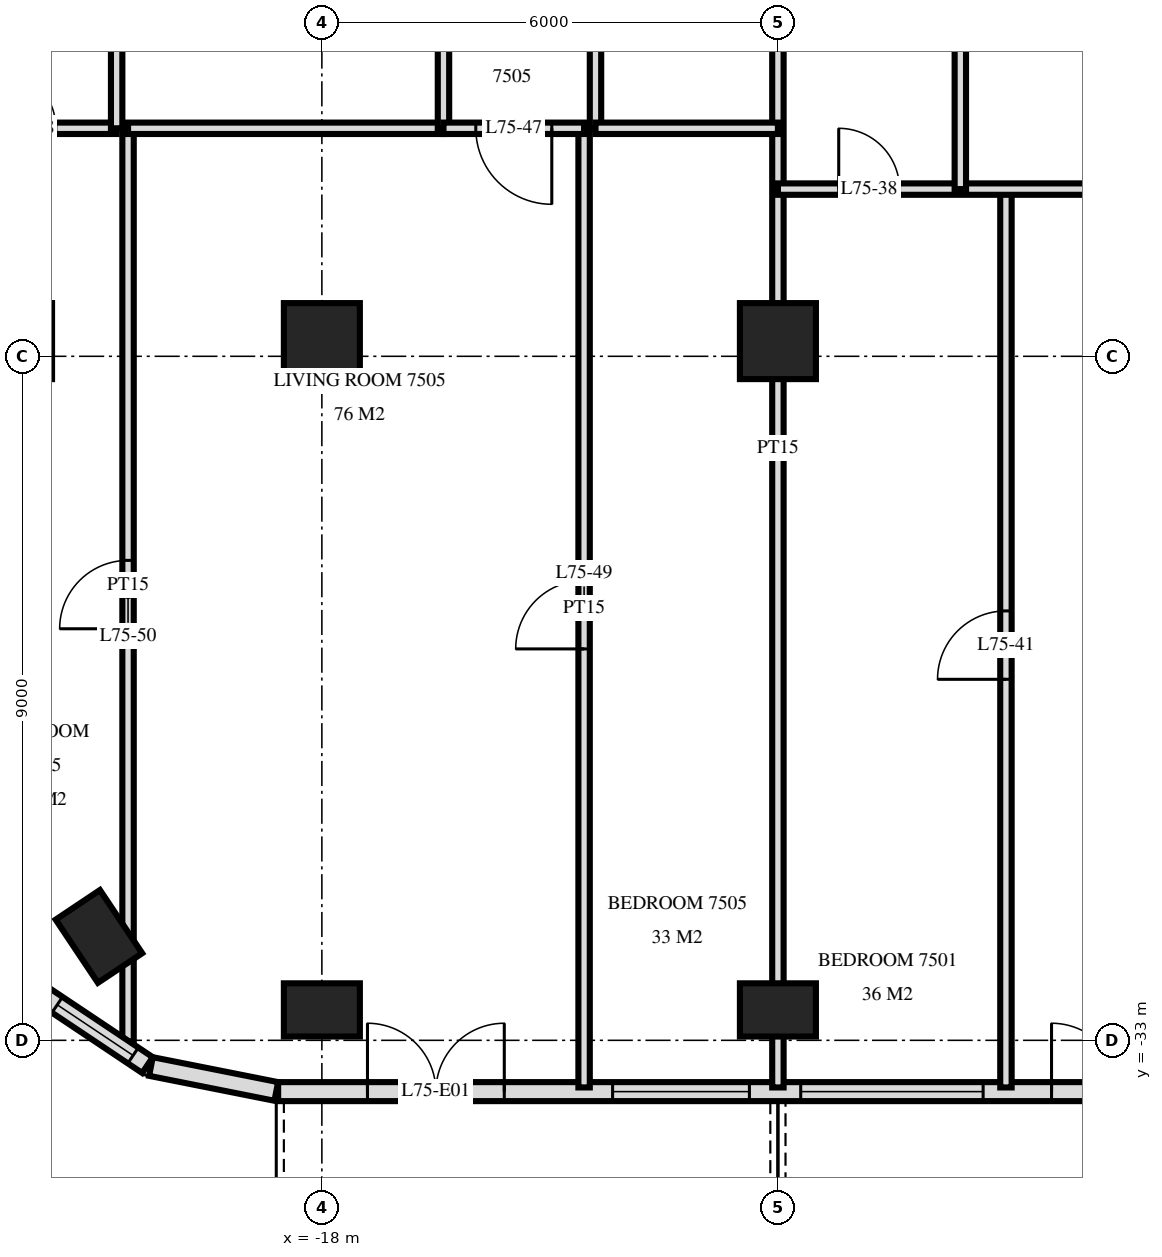
"""IFC4 building model, lengths in metres.
Left out: names, types, materials, properties, quantities, classifications, styles, units other than length and angle.
Written with IfcOpenShell. Run it as: python <this file> out.ifc"""

import sys

from ifc_helpers import new_model, si_unit, direction, frame, frame_2d, origin, origin_2d, place, context, subcontext, project, spatial, rectangle, extrude, element, fill, save


model = new_model("IFC4")
c1 = context("Model", 3, precision=1e-05, world=origin(), true_north=direction((0.0, 1.0)))
c2 = subcontext(c1, "Body", "Model", "MODEL_VIEW")
j1 = project(units=[si_unit("LENGTHUNIT", "METRE"), si_unit("PLANEANGLEUNIT", "RADIAN")], contexts=[c1])
p1 = place(None, origin())
s1 = spatial("IfcSite", under=j1, at=p1, CompositionType="ELEMENT")
p2 = place(p1, origin())
s2 = spatial("IfcBuilding", under=s1, at=p2, CompositionType="ELEMENT")
p3 = place(p2, frame((0.0, 0.0, 284.1)))
s3 = spatial("IfcBuildingStorey", under=s2, at=p3, CompositionType="ELEMENT", Elevation=284.1)
for number, where, z_axis, x_axis in (
    (1, (-21.9, -23.8, 0.0), (0.0, 0.0, 1.0), (0.0, 1.0, 0.0)),
    (2, (-20.933, -31.633, 0.0), (0.0, 0.0, 1.0), (-0.556, 0.831, 0.0)),
    (3, (-18.0, -32.6, 0.0), (0.0, 0.0, 1.0), (1.0, 0.0, 0.0)),
):
    element("IfcColumn", number, at=place(p3, frame(where, z_axis=z_axis, x_axis=x_axis)), inside=s3, PredefinedType="COLUMN", context=c2, shape_type="SweptSolid", body=[
        extrude(rectangle(XDim=1.0, YDim=0.7, at=origin_2d()), origin(), (0.0, 0.0, 1.0), 3.5),
    ])
p4 = place(p3, frame((-18.0, -23.8, 0.0), z_axis=(0.0, 0.0, 1.0), x_axis=(1.0, 0.0, 0.0)))
e4 = element("IfcColumn", 4, at=p4, inside=s3, PredefinedType="COLUMN", context=c2, shape_type="SweptSolid", body=[
    extrude(rectangle(XDim=1.0, YDim=1.0, at=origin_2d()), origin(), (0.0, 0.0, 1.0), 3.5),
])
p5 = place(p3, frame((-12.0, -32.6, 0.0), z_axis=(0.0, 0.0, 1.0), x_axis=(1.0, 0.0, 0.0)))
e5 = element("IfcColumn", 5, at=p5, inside=s3, PredefinedType="COLUMN", context=c2, shape_type="SweptSolid", body=[
    extrude(rectangle(XDim=1.0, YDim=0.7, at=origin_2d()), origin(), (0.0, 0.0, 1.0), 3.5),
])
p6 = place(p3, frame((-12.0, -23.8, 0.0), z_axis=(0.0, 0.0, 1.0), x_axis=(1.0, 0.0, 0.0)))
e6 = element("IfcColumn", 6, at=p6, inside=s3, PredefinedType="COLUMN", context=c2, shape_type="SweptSolid", body=[
    extrude(rectangle(XDim=1.0, YDim=1.0, at=origin_2d()), origin(), (0.0, 0.0, 1.0), 3.5),
])
p7 = place(p3, frame((-21.671, -32.406, 0.0), z_axis=(0.0, 0.0, 1.0), x_axis=(0.831482937015, -0.55555029066, 0.0)))
e7 = element("IfcWall", 7, at=p7, inside=s3, PredefinedType="SOLIDWALL", context=c2, shape_type="SweptSolid", body=[
    extrude(rectangle(XDim=1.656, YDim=0.25, at=frame_2d((0.828, 0.0))), origin(), (0.0, 0.0, 1.0), 3.22),
])
p8 = place(p7, frame((0.228, 0.0, 0.9)))
e8 = element("IfcOpeningElement", 8, at=p8, cuts=e7, PredefinedType="OPENING", context=c2, shape_type="SweptSolid", body=[
    extrude(rectangle(XDim=1.2, YDim=1.5, at=frame_2d((0.6, 0.75))), frame((0.0, 0.135, 0.0), z_axis=(0.0, -1.0, 0.0), x_axis=(1.0, 0.0, 0.0)), (0.0, 0.0, 1.0), 0.27),
])
p9 = place(p3, frame((-20.249, -33.344, 0.0), z_axis=(0.0, 0.0, 1.0), x_axis=(0.980770110232, -0.195166572128, 0.0)))
e9 = element("IfcWall", 9, at=p9, inside=s3, PredefinedType="SOLIDWALL", context=c2, shape_type="SweptSolid", body=[
    extrude(rectangle(XDim=1.681, YDim=0.25, at=frame_2d((0.841, 0.0))), origin(), (0.0, 0.0, 1.0), 3.22),
])
p10 = place(p3, frame((-18.575, -33.675, 0.0), z_axis=(0.0, 0.0, 1.0), x_axis=(1.0, 0.0, 0.0)))
e10 = element("IfcWall", 10, at=p10, inside=s3, PredefinedType="SOLIDWALL", context=c2, shape_type="SweptSolid", body=[
    extrude(rectangle(XDim=37.151, YDim=0.25, at=frame_2d((18.575, 0.0))), origin(), (0.0, 0.0, 1.0), 3.22),
])
p11 = place(p10, frame((1.175, 0.0, 0.0)))
e11 = element("IfcOpeningElement", 11, at=p11, cuts=e10, PredefinedType="OPENING", context=c2, shape_type="SweptSolid", body=[
    extrude(rectangle(XDim=1.8, YDim=2.4, at=frame_2d((0.9, 1.2))), frame((0.0, 0.135, 0.0), z_axis=(0.0, -1.0, 0.0), x_axis=(1.0, 0.0, 0.0)), (0.0, 0.0, 1.0), 0.27),
])
p12 = place(p10, frame((4.4, 0.0, 0.9)))
e12 = element("IfcOpeningElement", 12, at=p12, cuts=e10, PredefinedType="OPENING", context=c2, shape_type="SweptSolid", body=[
    extrude(rectangle(XDim=1.8, YDim=1.5, at=frame_2d((0.9, 0.75))), frame((0.0, 0.135, 0.0), z_axis=(0.0, -1.0, 0.0), x_axis=(1.0, 0.0, 0.0)), (0.0, 0.0, 1.0), 0.27),
])
p13 = place(p10, frame((6.875, 0.0, 0.9)))
e13 = element("IfcOpeningElement", 13, at=p13, cuts=e10, PredefinedType="OPENING", context=c2, shape_type="SweptSolid", body=[
    extrude(rectangle(XDim=2.4, YDim=1.5, at=frame_2d((1.2, 0.75))), frame((0.0, 0.135, 0.0), z_axis=(0.0, -1.0, 0.0), x_axis=(1.0, 0.0, 0.0)), (0.0, 0.0, 1.0), 0.27),
])
p14 = place(p10, frame((10.175, 0.0, 0.0)))
e14 = element("IfcOpeningElement", 14, at=p14, cuts=e10, PredefinedType="OPENING", context=c2, shape_type="SweptSolid", body=[
    extrude(rectangle(XDim=1.8, YDim=2.4, at=frame_2d((0.9, 1.2))), frame((0.0, 0.135, 0.0), z_axis=(0.0, -1.0, 0.0), x_axis=(1.0, 0.0, 0.0)), (0.0, 0.0, 1.0), 0.27),
])
p15 = place(p10, frame((13.175, 0.0, 0.0)))
e15 = element("IfcOpeningElement", 15, at=p15, cuts=e10, PredefinedType="OPENING", context=c2, shape_type="SweptSolid", body=[
    extrude(rectangle(XDim=1.8, YDim=2.4, at=frame_2d((0.9, 1.2))), frame((0.0, 0.135, 0.0), z_axis=(0.0, -1.0, 0.0), x_axis=(1.0, 0.0, 0.0)), (0.0, 0.0, 1.0), 0.27),
])
p16 = place(p10, frame((15.875, 0.0, 0.9)))
e16 = element("IfcOpeningElement", 16, at=p16, cuts=e10, PredefinedType="OPENING", context=c2, shape_type="SweptSolid", body=[
    extrude(rectangle(XDim=2.4, YDim=1.5, at=frame_2d((1.2, 0.75))), frame((0.0, 0.135, 0.0), z_axis=(0.0, -1.0, 0.0), x_axis=(1.0, 0.0, 0.0)), (0.0, 0.0, 1.0), 0.27),
])
p17 = place(p10, frame((19.175, 0.0, 0.0)))
e17 = element("IfcOpeningElement", 17, at=p17, cuts=e10, PredefinedType="OPENING", context=c2, shape_type="SweptSolid", body=[
    extrude(rectangle(XDim=1.8, YDim=2.4, at=frame_2d((0.9, 1.2))), frame((0.0, 0.135, 0.0), z_axis=(0.0, -1.0, 0.0), x_axis=(1.0, 0.0, 0.0)), (0.0, 0.0, 1.0), 0.27),
])
p18 = place(p10, frame((21.875, 0.0, 0.9)))
e18 = element("IfcOpeningElement", 18, at=p18, cuts=e10, PredefinedType="OPENING", context=c2, shape_type="SweptSolid", body=[
    extrude(rectangle(XDim=2.4, YDim=1.5, at=frame_2d((1.2, 0.75))), frame((0.0, 0.135, 0.0), z_axis=(0.0, -1.0, 0.0), x_axis=(1.0, 0.0, 0.0)), (0.0, 0.0, 1.0), 0.27),
])
p19 = place(p10, frame((25.063, 0.0, 0.9)))
e19 = element("IfcOpeningElement", 19, at=p19, cuts=e10, PredefinedType="OPENING", context=c2, shape_type="SweptSolid", body=[
    extrude(rectangle(XDim=1.8, YDim=1.5, at=frame_2d((0.9, 0.75))), frame((0.0, 0.135, 0.0), z_axis=(0.0, -1.0, 0.0), x_axis=(1.0, 0.0, 0.0)), (0.0, 0.0, 1.0), 0.27),
])
p20 = place(p10, frame((27.838, 0.0, 0.0)))
e20 = element("IfcOpeningElement", 20, at=p20, cuts=e10, PredefinedType="OPENING", context=c2, shape_type="SweptSolid", body=[
    extrude(rectangle(XDim=1.8, YDim=2.4, at=frame_2d((0.9, 1.2))), frame((0.0, 0.135, 0.0), z_axis=(0.0, -1.0, 0.0), x_axis=(1.0, 0.0, 0.0)), (0.0, 0.0, 1.0), 0.27),
])
p21 = place(p10, frame((31.175, 0.0, 0.0)))
e21 = element("IfcOpeningElement", 21, at=p21, cuts=e10, PredefinedType="OPENING", context=c2, shape_type="SweptSolid", body=[
    extrude(rectangle(XDim=1.8, YDim=2.4, at=frame_2d((0.9, 1.2))), frame((0.0, 0.135, 0.0), z_axis=(0.0, -1.0, 0.0), x_axis=(1.0, 0.0, 0.0)), (0.0, 0.0, 1.0), 0.27),
])
p22 = place(p3, frame((-9.0, -33.62, 0.0), z_axis=(0.0, 0.0, 1.0), x_axis=(0.0, 1.0, 0.0)))
e22 = element("IfcWall", 22, at=p22, inside=s3, PredefinedType="PARTITIONING", context=c2, shape_type="SweptSolid", body=[
    extrude(rectangle(XDim=11.82, YDim=0.15, at=frame_2d((5.91, 0.0))), origin(), (0.0, 0.0, 1.0), 3.22),
])
p23 = place(p22, frame((5.37, 0.0, 0.0)))
e23 = element("IfcOpeningElement", 23, at=p23, cuts=e22, PredefinedType="OPENING", context=c2, shape_type="SweptSolid", body=[
    extrude(rectangle(XDim=0.9, YDim=2.1, at=frame_2d((0.45, 1.05))), frame((0.0, 0.085, 0.0), z_axis=(0.0, -1.0, 0.0), x_axis=(1.0, 0.0, 0.0)), (0.0, 0.0, 1.0), 0.17),
])
p24 = place(p3, frame((-9.6, -21.8, 0.0), z_axis=(0.0, 0.0, 1.0), x_axis=(0.0, 1.0, 0.0)))
e24 = element("IfcWall", 24, at=p24, inside=s3, PredefinedType="PARTITIONING", context=c2, shape_type="SweptSolid", body=[
    extrude(rectangle(XDim=5.0, YDim=0.15, at=frame_2d((2.5, 0.0))), origin(), (0.0, 0.0, 1.0), 3.22),
])
p25 = place(p3, frame((-12.0, -33.62, 0.0), z_axis=(0.0, 0.0, 1.0), x_axis=(0.0, 1.0, 0.0)))
e25 = element("IfcWall", 25, at=p25, inside=s3, PredefinedType="PARTITIONING", context=c2, shape_type="SweptSolid", body=[
    extrude(rectangle(XDim=16.82, YDim=0.15, at=frame_2d((8.41, 0.0))), origin(), (0.0, 0.0, 1.0), 3.22),
])
p26 = place(p3, frame((-14.4, -21.0, 0.0), z_axis=(0.0, 0.0, 1.0), x_axis=(0.0, 1.0, 0.0)))
e26 = element("IfcWall", 26, at=p26, inside=s3, PredefinedType="PARTITIONING", context=c2, shape_type="SweptSolid", body=[
    extrude(rectangle(XDim=4.2, YDim=0.15, at=frame_2d((2.1, 0.0))), origin(), (0.0, 0.0, 1.0), 3.22),
])
p27 = place(p26, frame((1.6, 0.0, 0.0)))
e27 = element("IfcOpeningElement", 27, at=p27, cuts=e26, PredefinedType="OPENING", context=c2, shape_type="SweptSolid", body=[
    extrude(rectangle(XDim=1.0, YDim=2.1, at=frame_2d((0.5, 1.05))), frame((0.0, 0.085, 0.0), z_axis=(0.0, -1.0, 0.0), x_axis=(1.0, 0.0, 0.0)), (0.0, 0.0, 1.0), 0.17),
])
p28 = place(p3, frame((-14.55, -33.62, 0.0), z_axis=(0.0, 0.0, 1.0), x_axis=(0.0, 1.0, 0.0)))
e28 = element("IfcWall", 28, at=p28, inside=s3, PredefinedType="PARTITIONING", context=c2, shape_type="SweptSolid", body=[
    extrude(rectangle(XDim=12.62, YDim=0.15, at=frame_2d((6.31, 0.0))), origin(), (0.0, 0.0, 1.0), 3.22),
])
p29 = place(p28, frame((5.77, 0.0, 0.0)))
e29 = element("IfcOpeningElement", 29, at=p29, cuts=e28, PredefinedType="OPENING", context=c2, shape_type="SweptSolid", body=[
    extrude(rectangle(XDim=0.9, YDim=2.1, at=frame_2d((0.45, 1.05))), frame((0.0, 0.085, 0.0), z_axis=(0.0, -1.0, 0.0), x_axis=(1.0, 0.0, 0.0)), (0.0, 0.0, 1.0), 0.17),
])
p30 = place(p3, frame((-16.4, -21.0, 0.0), z_axis=(0.0, 0.0, 1.0), x_axis=(0.0, 1.0, 0.0)))
e30 = element("IfcWall", 30, at=p30, inside=s3, PredefinedType="PARTITIONING", context=c2, shape_type="SweptSolid", body=[
    extrude(rectangle(XDim=4.2, YDim=0.15, at=frame_2d((2.1, 0.0))), origin(), (0.0, 0.0, 1.0), 3.22),
])
p31 = place(p30, frame((1.6, 0.0, 0.0)))
e31 = element("IfcOpeningElement", 31, at=p31, cuts=e30, PredefinedType="OPENING", context=c2, shape_type="SweptSolid", body=[
    extrude(rectangle(XDim=1.0, YDim=2.1, at=frame_2d((0.5, 1.05))), frame((0.0, 0.085, 0.0), z_axis=(0.0, -1.0, 0.0), x_axis=(1.0, 0.0, 0.0)), (0.0, 0.0, 1.0), 0.17),
])
p32 = place(p3, frame((-20.55, -33.017, 0.0), z_axis=(0.0, 0.0, 1.0), x_axis=(0.0, 1.0, 0.0)))
e32 = element("IfcWall", 32, at=p32, inside=s3, PredefinedType="PARTITIONING", context=c2, shape_type="SweptSolid", body=[
    extrude(rectangle(XDim=12.017, YDim=0.15, at=frame_2d((6.008, 0.0))), origin(), (0.0, 0.0, 1.0), 3.22),
])
p33 = place(p32, frame((5.432, 0.0, 0.0)))
e33 = element("IfcOpeningElement", 33, at=p33, cuts=e32, PredefinedType="OPENING", context=c2, shape_type="SweptSolid", body=[
    extrude(rectangle(XDim=0.9, YDim=2.1, at=frame_2d((0.45, 1.05))), frame((0.0, 0.085, 0.0), z_axis=(0.0, -1.0, 0.0), x_axis=(1.0, 0.0, 0.0)), (0.0, 0.0, 1.0), 0.17),
])
p34 = place(p3, frame((-20.7, -21.0, 0.0), z_axis=(0.0, 0.0, 1.0), x_axis=(0.0, 1.0, 0.0)))
e34 = element("IfcWall", 34, at=p34, inside=s3, PredefinedType="PARTITIONING", context=c2, shape_type="SweptSolid", body=[
    extrude(rectangle(XDim=4.2, YDim=0.15, at=frame_2d((2.1, 0.0))), origin(), (0.0, 0.0, 1.0), 3.22),
])
p35 = place(p3, frame((-12.0, -21.8, 0.0), z_axis=(0.0, 0.0, 1.0), x_axis=(1.0, 0.0, 0.0)))
e35 = element("IfcWall", 35, at=p35, inside=s3, PredefinedType="PARTITIONING", context=c2, shape_type="SweptSolid", body=[
    extrude(rectangle(XDim=5.4, YDim=0.15, at=frame_2d((2.7, 0.0))), origin(), (0.0, 0.0, 1.0), 3.22),
])
p36 = place(p35, frame((0.8, 0.0, 0.0)))
e36 = element("IfcOpeningElement", 36, at=p36, cuts=e35, PredefinedType="OPENING", context=c2, shape_type="SweptSolid", body=[
    extrude(rectangle(XDim=0.8, YDim=2.1, at=frame_2d((0.4, 1.05))), frame((0.0, 0.085, 0.0), z_axis=(0.0, -1.0, 0.0), x_axis=(1.0, 0.0, 0.0)), (0.0, 0.0, 1.0), 0.17),
])
p37 = place(p3, frame((-16.4, -21.0, 0.0), z_axis=(0.0, 0.0, 1.0), x_axis=(1.0, 0.0, 0.0)))
e37 = element("IfcWall", 37, at=p37, inside=s3, PredefinedType="PARTITIONING", context=c2, shape_type="SweptSolid", body=[
    extrude(rectangle(XDim=1.85, YDim=0.15, at=frame_2d((0.925, 0.0))), origin(), (0.0, 0.0, 1.0), 3.22),
])
p38 = place(p37, frame((0.425, 0.0, 0.0)))
e38 = element("IfcOpeningElement", 38, at=p38, cuts=e37, PredefinedType="OPENING", context=c2, shape_type="SweptSolid", body=[
    extrude(rectangle(XDim=1.0, YDim=2.1, at=frame_2d((0.5, 1.05))), frame((0.0, 0.085, 0.0), z_axis=(0.0, -1.0, 0.0), x_axis=(1.0, 0.0, 0.0)), (0.0, 0.0, 1.0), 0.17),
])
p39 = place(p3, frame((-22.92, -21.0, 0.0), z_axis=(0.0, 0.0, 1.0), x_axis=(1.0, 0.0, 0.0)))
e39 = element("IfcWall", 39, at=p39, inside=s3, PredefinedType="PARTITIONING", context=c2, shape_type="SweptSolid", body=[
    extrude(rectangle(XDim=2.22, YDim=0.15, at=frame_2d((1.11, 0.0))), origin(), (0.0, 0.0, 1.0), 3.22),
])
p40 = place(p39, frame((0.62, 0.0, 0.0)))
e40 = element("IfcOpeningElement", 40, at=p40, cuts=e39, PredefinedType="OPENING", context=c2, shape_type="SweptSolid", body=[
    extrude(rectangle(XDim=0.8, YDim=2.1, at=frame_2d((0.4, 1.05))), frame((0.0, 0.085, 0.0), z_axis=(0.0, -1.0, 0.0), x_axis=(1.0, 0.0, 0.0)), (0.0, 0.0, 1.0), 0.17),
])
p41 = place(p3, frame((-20.55, -21.0, 0.0), z_axis=(0.0, 0.0, 1.0), x_axis=(1.0, 0.0, 0.0)))
e41 = element("IfcWall", 41, at=p41, inside=s3, PredefinedType="PARTITIONING", context=c2, shape_type="SweptSolid", body=[
    extrude(rectangle(XDim=4.15, YDim=0.15, at=frame_2d((2.075, 0.0))), origin(), (0.0, 0.0, 1.0), 3.22),
])
p42 = place(p3, frame((-14.4, -21.0, 0.0), z_axis=(0.0, 0.0, 1.0), x_axis=(1.0, 0.0, 0.0)))
e42 = element("IfcWall", 42, at=p42, inside=s3, PredefinedType="PARTITIONING", context=c2, shape_type="SweptSolid", body=[
    extrude(rectangle(XDim=2.4, YDim=0.15, at=frame_2d((1.2, 0.0))), origin(), (0.0, 0.0, 1.0), 3.22),
])
p43 = place(p8, origin())
e43 = element("IfcWindow", 43, at=p43, inside=s3, PartitioningType="SINGLE_PANEL", PredefinedType="WINDOW", context=c2, shape_type="SweptSolid", body=[
    extrude(rectangle(XDim=1.2, YDim=1.5, at=frame_2d((0.6, 0.75))), frame((0.0, 0.03, 0.0), z_axis=(0.0, -1.0, 0.0), x_axis=(1.0, 0.0, 0.0)), (0.0, 0.0, 1.0), 0.06),
])
fill(e8, e43)
p44 = place(p11, origin())
e44 = element("IfcDoor", 44, at=p44, inside=s3, OperationType="DOUBLE_DOOR_SINGLE_SWING", PredefinedType="DOOR", context=c2, shape_type="SweptSolid", body=[
    extrude(rectangle(XDim=1.8, YDim=2.4, at=frame_2d((0.9, 1.2))), frame((0.0, 0.025, 0.0), z_axis=(0.0, -1.0, 0.0), x_axis=(1.0, 0.0, 0.0)), (0.0, 0.0, 1.0), 0.05),
])
fill(e11, e44)
p45 = place(p12, origin())
e45 = element("IfcWindow", 45, at=p45, inside=s3, PartitioningType="SINGLE_PANEL", PredefinedType="WINDOW", context=c2, shape_type="SweptSolid", body=[
    extrude(rectangle(XDim=1.8, YDim=1.5, at=frame_2d((0.9, 0.75))), frame((0.0, 0.03, 0.0), z_axis=(0.0, -1.0, 0.0), x_axis=(1.0, 0.0, 0.0)), (0.0, 0.0, 1.0), 0.06),
])
fill(e12, e45)
p46 = place(p13, origin())
e46 = element("IfcWindow", 46, at=p46, inside=s3, PartitioningType="SINGLE_PANEL", PredefinedType="WINDOW", context=c2, shape_type="SweptSolid", body=[
    extrude(rectangle(XDim=2.4, YDim=1.5, at=frame_2d((1.2, 0.75))), frame((0.0, 0.03, 0.0), z_axis=(0.0, -1.0, 0.0), x_axis=(1.0, 0.0, 0.0)), (0.0, 0.0, 1.0), 0.06),
])
fill(e13, e46)
p47 = place(p14, origin())
e47 = element("IfcDoor", 47, at=p47, inside=s3, OperationType="DOUBLE_DOOR_SINGLE_SWING", PredefinedType="DOOR", context=c2, shape_type="SweptSolid", body=[
    extrude(rectangle(XDim=1.8, YDim=2.4, at=frame_2d((0.9, 1.2))), frame((0.0, 0.025, 0.0), z_axis=(0.0, -1.0, 0.0), x_axis=(1.0, 0.0, 0.0)), (0.0, 0.0, 1.0), 0.05),
])
fill(e14, e47)
p48 = place(p36, origin())
e48 = element("IfcDoor", 48, at=p48, inside=s3, OperationType="SINGLE_SWING_RIGHT", PredefinedType="DOOR", context=c2, shape_type="SweptSolid", body=[
    extrude(rectangle(XDim=0.8, YDim=2.1, at=frame_2d((0.4, 1.05))), frame((0.0, 0.025, 0.0), z_axis=(0.0, -1.0, 0.0), x_axis=(1.0, 0.0, 0.0)), (0.0, 0.0, 1.0), 0.05),
])
fill(e36, e48)
p49 = place(p23, origin())
e49 = element("IfcDoor", 49, at=p49, inside=s3, OperationType="SINGLE_SWING_RIGHT", PredefinedType="DOOR", context=c2, shape_type="SweptSolid", body=[
    extrude(rectangle(XDim=0.9, YDim=2.1, at=frame_2d((0.45, 1.05))), frame((0.0, 0.025, 0.0), z_axis=(0.0, -1.0, 0.0), x_axis=(1.0, 0.0, 0.0)), (0.0, 0.0, 1.0), 0.05),
])
fill(e23, e49)
p50 = place(p38, frame((0.5, 0.0, 0.0), z_axis=(0.0, 0.0, 1.0), x_axis=(-1.0, 0.0, 0.0)))
e50 = element("IfcDoor", 50, at=p50, inside=s3, OperationType="SINGLE_SWING_RIGHT", PredefinedType="DOOR", context=c2, shape_type="SweptSolid", body=[
    extrude(rectangle(XDim=1.0, YDim=2.1, at=frame_2d((0.0, 1.05))), frame((0.0, -0.025, 0.0), z_axis=(0.0, 1.0, 0.0), x_axis=(-1.0, 0.0, 0.0)), (0.0, 0.0, 1.0), 0.05),
])
fill(e38, e50)
p51 = place(p40, origin())
e51 = element("IfcDoor", 51, at=p51, inside=s3, OperationType="SINGLE_SWING_RIGHT", PredefinedType="DOOR", context=c2, shape_type="SweptSolid", body=[
    extrude(rectangle(XDim=0.8, YDim=2.1, at=frame_2d((0.4, 1.05))), frame((0.0, 0.025, 0.0), z_axis=(0.0, -1.0, 0.0), x_axis=(1.0, 0.0, 0.0)), (0.0, 0.0, 1.0), 0.05),
])
fill(e40, e51)
p52 = place(p29, origin())
e52 = element("IfcDoor", 52, at=p52, inside=s3, OperationType="SINGLE_SWING_RIGHT", PredefinedType="DOOR", context=c2, shape_type="SweptSolid", body=[
    extrude(rectangle(XDim=0.9, YDim=2.1, at=frame_2d((0.45, 1.05))), frame((0.0, 0.025, 0.0), z_axis=(0.0, -1.0, 0.0), x_axis=(1.0, 0.0, 0.0)), (0.0, 0.0, 1.0), 0.05),
])
fill(e29, e52)
p53 = place(p33, origin())
e53 = element("IfcDoor", 53, at=p53, inside=s3, OperationType="SINGLE_SWING_RIGHT", PredefinedType="DOOR", context=c2, shape_type="SweptSolid", body=[
    extrude(rectangle(XDim=0.9, YDim=2.1, at=frame_2d((0.45, 1.05))), frame((0.0, 0.025, 0.0), z_axis=(0.0, -1.0, 0.0), x_axis=(1.0, 0.0, 0.0)), (0.0, 0.0, 1.0), 0.05),
])
fill(e33, e53)
save(model, sys.argv[1])
